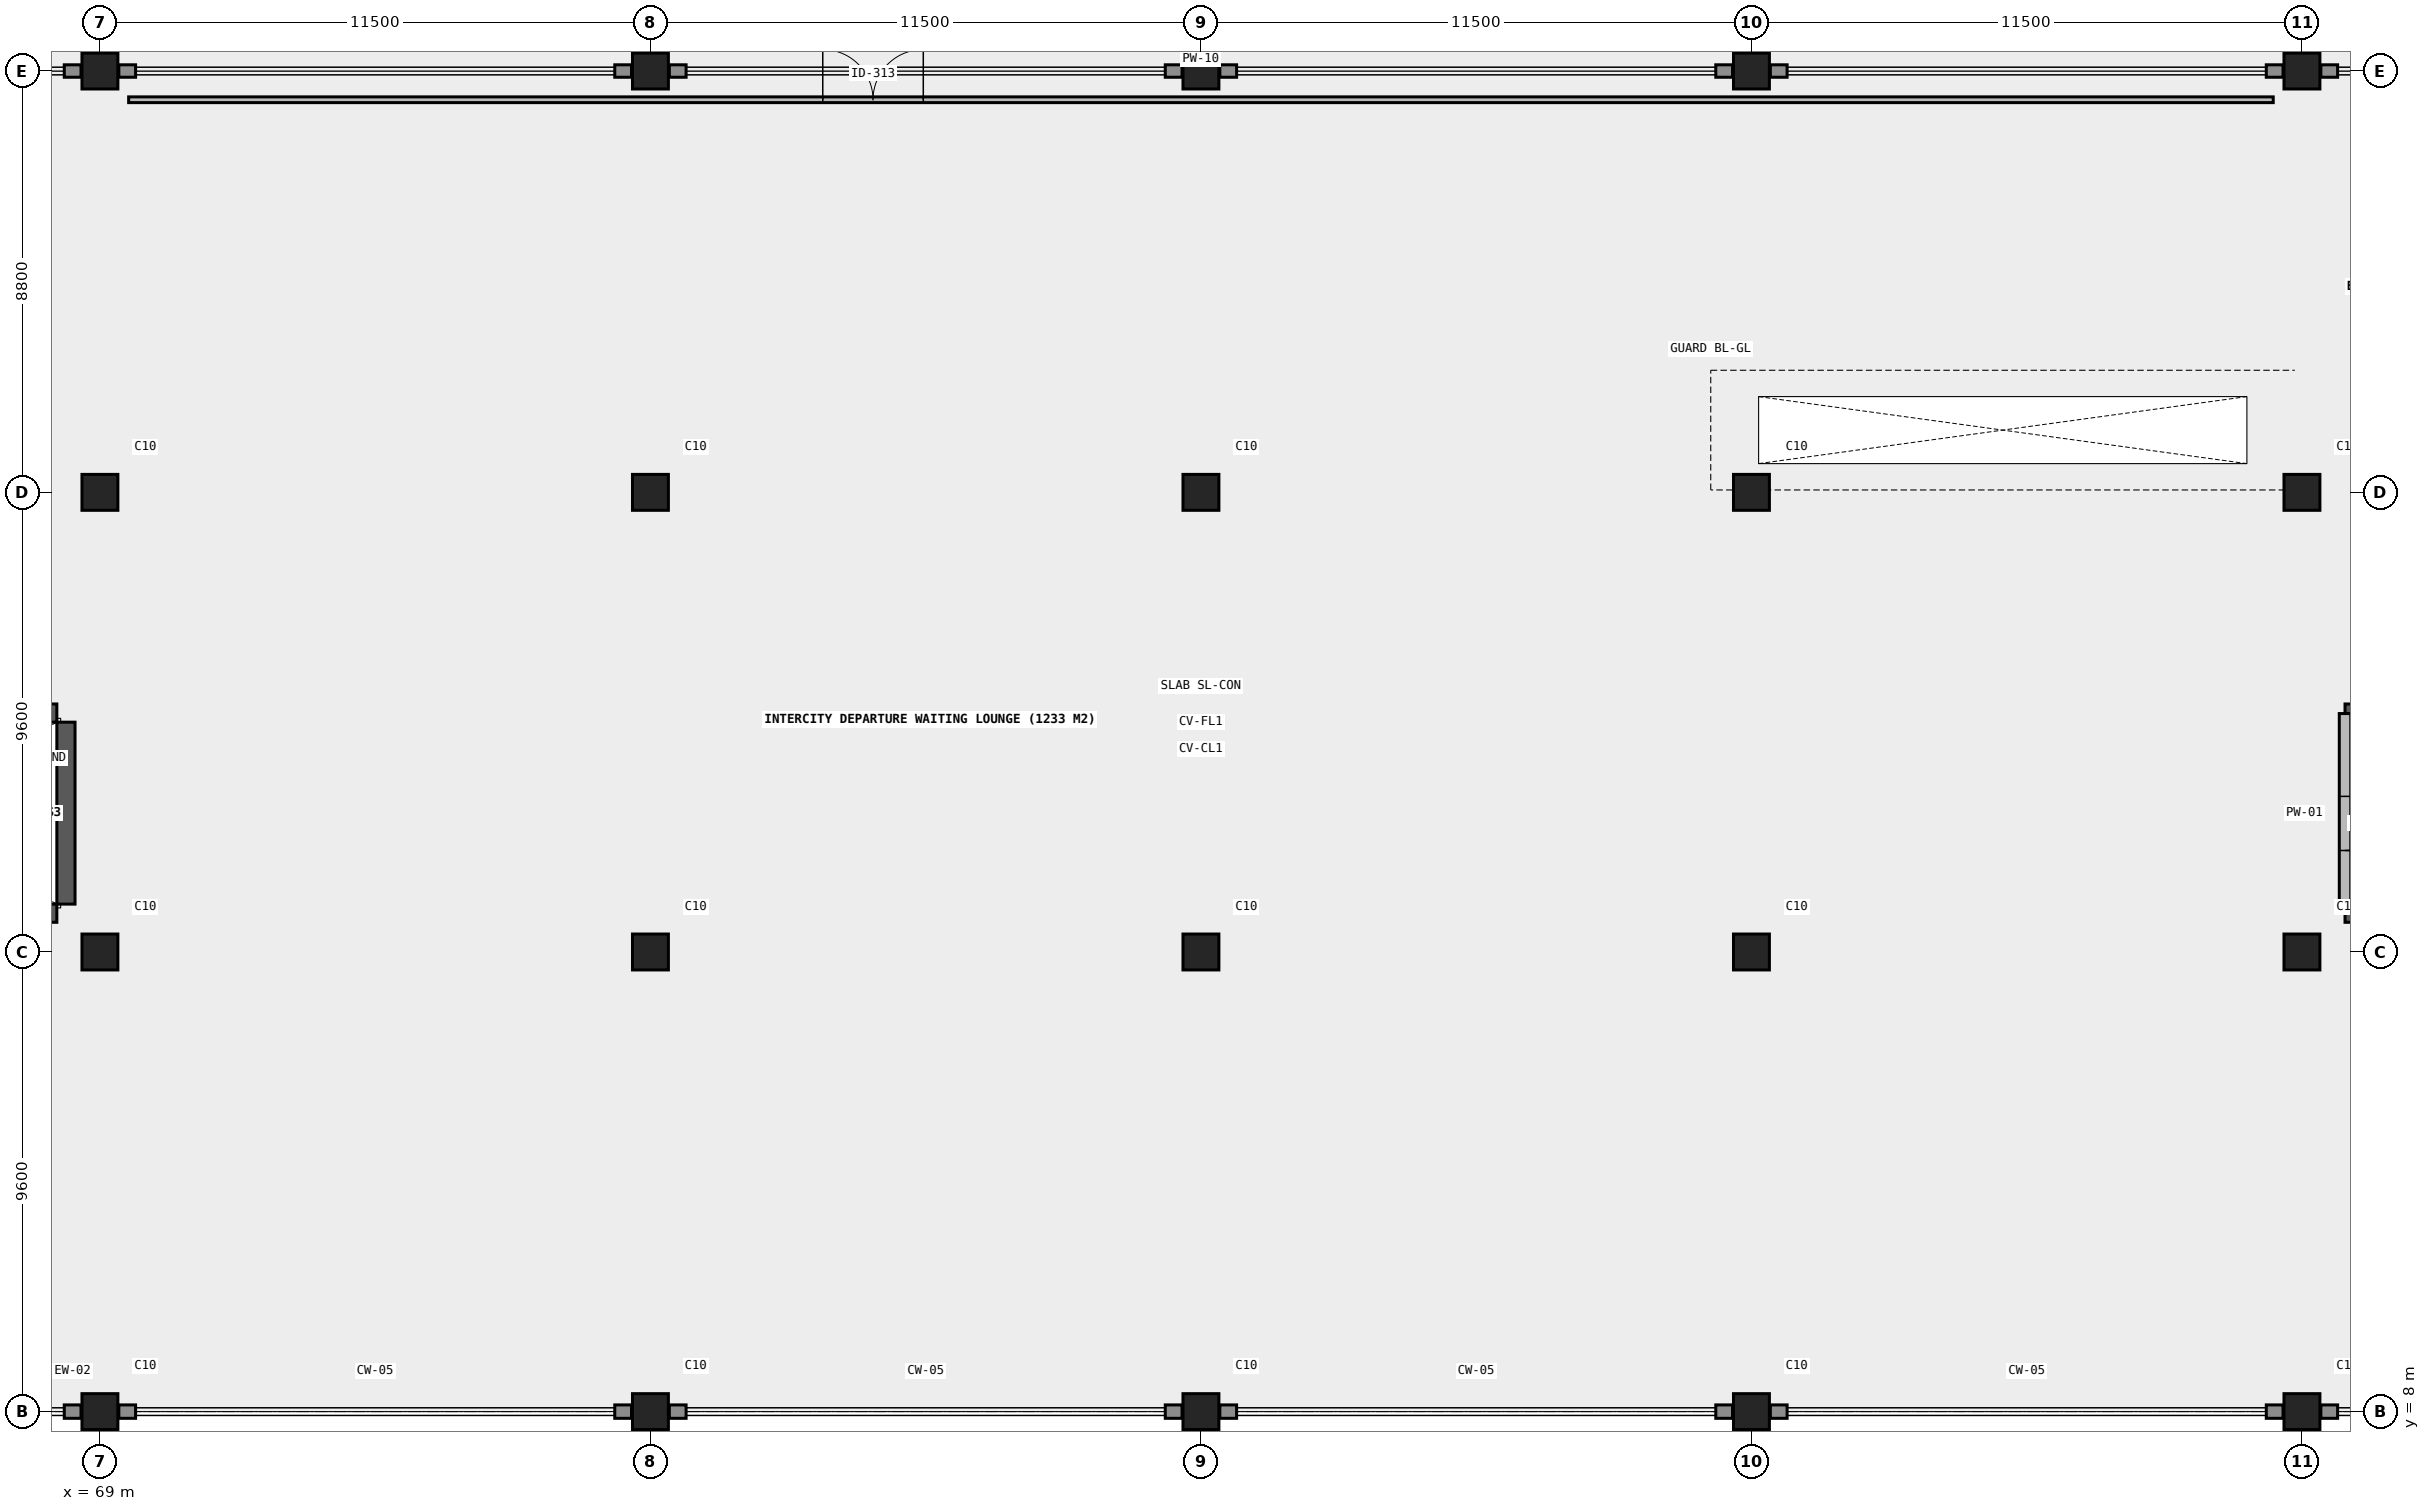
"""IFC4 building model, lengths in metres.
Left out: names, types, materials, properties, quantities, classifications, styles, units other than length and angle.
Written with IfcOpenShell. Run it as: python <this file> out.ifc"""

import sys

from ifc_helpers import new_model, si_unit, direction, frame, frame_2d, origin, origin_2d, place, context, subcontext, project, spatial, rectangle, circle, extrude, element, fill, save


model = new_model("IFC4")
c1 = context("Model", 3, precision=1e-05, world=origin(), true_north=direction((0.0, 1.0)))
c2 = subcontext(c1, "Body", "Model", "MODEL_VIEW")
j1 = project(units=[si_unit("LENGTHUNIT", "METRE"), si_unit("PLANEANGLEUNIT", "RADIAN")], contexts=[c1])
p1 = place(None, origin())
s1 = spatial("IfcSite", under=j1, at=p1, CompositionType="ELEMENT")
p2 = place(p1, origin())
s2 = spatial("IfcBuilding", under=s1, at=p2, CompositionType="ELEMENT")
p3 = place(p2, frame((0.0, 0.0, 8.4)))
s3 = spatial("IfcBuildingStorey", under=s2, at=p3, CompositionType="ELEMENT", Elevation=8.4)
for number, where, z_axis, x_axis in (
    (1, (69.0, 8.0, 0.0), (0.0, 0.0, 1.0), (1.0, 0.0, 0.0)),
    (2, (69.0, 17.6, 0.0), (0.0, 0.0, 1.0), (1.0, 0.0, 0.0)),
    (3, (69.0, 27.2, 0.0), (0.0, 0.0, 1.0), (1.0, 0.0, 0.0)),
):
    element("IfcColumn", number, at=place(p3, frame(where, z_axis=z_axis, x_axis=x_axis)), inside=s3, PredefinedType="COLUMN", context=c2, shape_type="SweptSolid", body=[
        extrude(circle(Radius=0.375, at=origin_2d()), origin(), (0.0, 0.0, 1.0), 5.4),
    ])
p4 = place(p3, frame((69.0, 36.0, 0.0), z_axis=(0.0, 0.0, 1.0), x_axis=(1.0, 0.0, 0.0)))
e4 = element("IfcColumn", 4, at=p4, inside=s3, PredefinedType="COLUMN", context=c2, shape_type="SweptSolid", body=[
    extrude(rectangle(XDim=0.75, YDim=0.75, at=origin_2d()), origin(), (0.0, 0.0, 1.0), 5.4),
])
for number, where, z_axis, x_axis in (
    (5, (80.5, 8.0, 0.0), (0.0, 0.0, 1.0), (1.0, 0.0, 0.0)),
    (6, (80.5, 17.6, 0.0), (0.0, 0.0, 1.0), (1.0, 0.0, 0.0)),
    (7, (80.5, 27.2, 0.0), (0.0, 0.0, 1.0), (1.0, 0.0, 0.0)),
):
    element("IfcColumn", number, at=place(p3, frame(where, z_axis=z_axis, x_axis=x_axis)), inside=s3, PredefinedType="COLUMN", context=c2, shape_type="SweptSolid", body=[
        extrude(circle(Radius=0.375, at=origin_2d()), origin(), (0.0, 0.0, 1.0), 5.4),
    ])
p5 = place(p3, frame((80.5, 36.0, 0.0), z_axis=(0.0, 0.0, 1.0), x_axis=(1.0, 0.0, 0.0)))
e8 = element("IfcColumn", 8, at=p5, inside=s3, PredefinedType="COLUMN", context=c2, shape_type="SweptSolid", body=[
    extrude(rectangle(XDim=0.75, YDim=0.75, at=origin_2d()), origin(), (0.0, 0.0, 1.0), 5.4),
])
for number, where, z_axis, x_axis in (
    (9, (92.0, 8.0, 0.0), (0.0, 0.0, 1.0), (1.0, 0.0, 0.0)),
    (10, (92.0, 17.6, 0.0), (0.0, 0.0, 1.0), (1.0, 0.0, 0.0)),
    (11, (92.0, 27.2, 0.0), (0.0, 0.0, 1.0), (1.0, 0.0, 0.0)),
):
    element("IfcColumn", number, at=place(p3, frame(where, z_axis=z_axis, x_axis=x_axis)), inside=s3, PredefinedType="COLUMN", context=c2, shape_type="SweptSolid", body=[
        extrude(circle(Radius=0.375, at=origin_2d()), origin(), (0.0, 0.0, 1.0), 5.4),
    ])
p6 = place(p3, frame((92.0, 36.0, 0.0), z_axis=(0.0, 0.0, 1.0), x_axis=(1.0, 0.0, 0.0)))
e12 = element("IfcColumn", 12, at=p6, inside=s3, PredefinedType="COLUMN", context=c2, shape_type="SweptSolid", body=[
    extrude(rectangle(XDim=0.75, YDim=0.75, at=origin_2d()), origin(), (0.0, 0.0, 1.0), 5.4),
])
for number, where, z_axis, x_axis in (
    (13, (103.5, 8.0, 0.0), (0.0, 0.0, 1.0), (1.0, 0.0, 0.0)),
    (14, (103.5, 17.6, 0.0), (0.0, 0.0, 1.0), (1.0, 0.0, 0.0)),
    (15, (103.5, 27.2, 0.0), (0.0, 0.0, 1.0), (1.0, 0.0, 0.0)),
):
    element("IfcColumn", number, at=place(p3, frame(where, z_axis=z_axis, x_axis=x_axis)), inside=s3, PredefinedType="COLUMN", context=c2, shape_type="SweptSolid", body=[
        extrude(circle(Radius=0.375, at=origin_2d()), origin(), (0.0, 0.0, 1.0), 5.4),
    ])
p7 = place(p3, frame((103.5, 36.0, 0.0), z_axis=(0.0, 0.0, 1.0), x_axis=(1.0, 0.0, 0.0)))
e16 = element("IfcColumn", 16, at=p7, inside=s3, PredefinedType="COLUMN", context=c2, shape_type="SweptSolid", body=[
    extrude(rectangle(XDim=0.75, YDim=0.75, at=origin_2d()), origin(), (0.0, 0.0, 1.0), 5.4),
])
for number, where, z_axis, x_axis in (
    (17, (115.0, 8.0, 0.0), (0.0, 0.0, 1.0), (1.0, 0.0, 0.0)),
    (18, (115.0, 17.6, 0.0), (0.0, 0.0, 1.0), (1.0, 0.0, 0.0)),
    (19, (115.0, 27.2, 0.0), (0.0, 0.0, 1.0), (1.0, 0.0, 0.0)),
):
    element("IfcColumn", number, at=place(p3, frame(where, z_axis=z_axis, x_axis=x_axis)), inside=s3, PredefinedType="COLUMN", context=c2, shape_type="SweptSolid", body=[
        extrude(circle(Radius=0.375, at=origin_2d()), origin(), (0.0, 0.0, 1.0), 5.4),
    ])
p8 = place(p3, frame((115.0, 36.0, 0.0), z_axis=(0.0, 0.0, 1.0), x_axis=(1.0, 0.0, 0.0)))
e20 = element("IfcColumn", 20, at=p8, inside=s3, PredefinedType="COLUMN", context=c2, shape_type="SweptSolid", body=[
    extrude(rectangle(XDim=0.75, YDim=0.75, at=origin_2d()), origin(), (0.0, 0.0, 1.0), 5.4),
])
p9 = place(p3, frame((58.7, 18.41, 0.0), z_axis=(0.0, 0.0, 1.0), x_axis=(1.0, 0.0, 0.0)))
e21 = element("IfcWall", 21, at=p9, inside=s3, PredefinedType="SHEAR", context=c2, shape_type="SweptSolid", body=[
    extrude(rectangle(XDim=9.4, YDim=0.38, at=frame_2d((4.7, 0.0))), origin(), (0.0, 0.0, 1.0), 5.4),
])
p10 = place(p3, frame((58.7, 22.59, 0.0), z_axis=(0.0, 0.0, 1.0), x_axis=(1.0, 0.0, 0.0)))
e22 = element("IfcWall", 22, at=p10, inside=s3, PredefinedType="SHEAR", context=c2, shape_type="SweptSolid", body=[
    extrude(rectangle(XDim=9.4, YDim=0.38, at=frame_2d((4.7, 0.0))), origin(), (0.0, 0.0, 1.0), 5.4),
])
p11 = place(p10, frame((0.55, 0.0, 0.0)))
e23 = element("IfcOpeningElement", 23, at=p11, cuts=e22, PredefinedType="OPENING", context=c2, shape_type="SweptSolid", body=[
    extrude(rectangle(XDim=1.13, YDim=2.15, at=frame_2d((0.565, 1.075))), frame((0.0, 0.2, 0.0), z_axis=(0.0, -1.0, 0.0), x_axis=(1.0, 0.0, 0.0)), (0.0, 0.0, 1.0), 0.4),
])
p12 = place(p3, frame((68.29, 18.6, 0.0), z_axis=(0.0, 0.0, 1.0), x_axis=(0.0, 1.0, 0.0)))
e24 = element("IfcWall", 24, at=p12, inside=s3, PredefinedType="SHEAR", context=c2, shape_type="SweptSolid", body=[
    extrude(rectangle(XDim=3.8, YDim=0.38, at=frame_2d((1.9, 0.0))), origin(), (0.0, 0.0, 1.0), 5.4),
])
p13 = place(p3, frame((115.9, 18.41, 0.0), z_axis=(0.0, 0.0, 1.0), x_axis=(1.0, 0.0, 0.0)))
e25 = element("IfcWall", 25, at=p13, inside=s3, PredefinedType="SHEAR", context=c2, shape_type="SweptSolid", body=[
    extrude(rectangle(XDim=9.4, YDim=0.38, at=frame_2d((4.7, 0.0))), origin(), (0.0, 0.0, 1.0), 5.4),
])
p14 = place(p3, frame((115.9, 22.59, 0.0), z_axis=(0.0, 0.0, 1.0), x_axis=(1.0, 0.0, 0.0)))
e26 = element("IfcWall", 26, at=p14, inside=s3, PredefinedType="SHEAR", context=c2, shape_type="SweptSolid", body=[
    extrude(rectangle(XDim=9.4, YDim=0.38, at=frame_2d((4.7, 0.0))), origin(), (0.0, 0.0, 1.0), 5.4),
])
p15 = place(p14, frame((0.55, 0.0, 0.0)))
e27 = element("IfcOpeningElement", 27, at=p15, cuts=e26, PredefinedType="OPENING", context=c2, shape_type="SweptSolid", body=[
    extrude(rectangle(XDim=1.13, YDim=2.15, at=frame_2d((0.565, 1.075))), frame((0.0, 0.2, 0.0), z_axis=(0.0, -1.0, 0.0), x_axis=(1.0, 0.0, 0.0)), (0.0, 0.0, 1.0), 0.4),
])
for number, where, z_axis, x_axis in (
    (28, (68.255, 8.0, 0.0), (0.0, 0.0, 1.0), (1.0, 0.0, 0.0)),
    (29, (69.395, 8.0, 0.0), (0.0, 0.0, 1.0), (1.0, 0.0, 0.0)),
    (30, (79.755, 8.0, 0.0), (0.0, 0.0, 1.0), (1.0, 0.0, 0.0)),
    (31, (80.895, 8.0, 0.0), (0.0, 0.0, 1.0), (1.0, 0.0, 0.0)),
    (32, (91.255, 8.0, 0.0), (0.0, 0.0, 1.0), (1.0, 0.0, 0.0)),
    (33, (92.395, 8.0, 0.0), (0.0, 0.0, 1.0), (1.0, 0.0, 0.0)),
    (34, (102.755, 8.0, 0.0), (0.0, 0.0, 1.0), (1.0, 0.0, 0.0)),
    (35, (103.895, 8.0, 0.0), (0.0, 0.0, 1.0), (1.0, 0.0, 0.0)),
    (36, (114.255, 8.0, 0.0), (0.0, 0.0, 1.0), (1.0, 0.0, 0.0)),
    (37, (115.395, 8.0, 0.0), (0.0, 0.0, 1.0), (1.0, 0.0, 0.0)),
):
    element("IfcWall", number, at=place(p3, frame(where, z_axis=z_axis, x_axis=x_axis)), inside=s3, PredefinedType="SOLIDWALL", context=c2, shape_type="SweptSolid", body=[
        extrude(rectangle(XDim=0.35, YDim=0.28, at=frame_2d((0.175, 0.0))), origin(), (0.0, 0.0, 1.0), 5.14),
    ])
for number, where, z_axis, x_axis in (
    (38, (68.255, 36.0, 0.0), (0.0, 0.0, 1.0), (1.0, 0.0, 0.0)),
    (39, (69.395, 36.0, 0.0), (0.0, 0.0, 1.0), (1.0, 0.0, 0.0)),
    (40, (79.755, 36.0, 0.0), (0.0, 0.0, 1.0), (1.0, 0.0, 0.0)),
    (41, (80.895, 36.0, 0.0), (0.0, 0.0, 1.0), (1.0, 0.0, 0.0)),
    (42, (91.255, 36.0, 0.0), (0.0, 0.0, 1.0), (1.0, 0.0, 0.0)),
    (43, (92.395, 36.0, 0.0), (0.0, 0.0, 1.0), (1.0, 0.0, 0.0)),
    (44, (102.755, 36.0, 0.0), (0.0, 0.0, 1.0), (1.0, 0.0, 0.0)),
    (45, (103.895, 36.0, 0.0), (0.0, 0.0, 1.0), (1.0, 0.0, 0.0)),
    (46, (114.255, 36.0, 0.0), (0.0, 0.0, 1.0), (1.0, 0.0, 0.0)),
    (47, (115.395, 36.0, 0.0), (0.0, 0.0, 1.0), (1.0, 0.0, 0.0)),
):
    element("IfcWall", number, at=place(p3, frame(where, z_axis=z_axis, x_axis=x_axis)), inside=s3, PredefinedType="SOLIDWALL", context=c2, shape_type="SweptSolid", body=[
        extrude(rectangle(XDim=0.35, YDim=0.26, at=frame_2d((0.175, 0.0))), origin(), (0.0, 0.0, 1.0), 5.1),
    ])
p16 = place(p3, frame((115.9, 18.42, 0.0), z_axis=(0.0, 0.0, 1.0), x_axis=(0.0, 1.0, 0.0)))
e48 = element("IfcWall", 48, at=p16, inside=s3, PredefinedType="SOLIDWALL", context=c2, shape_type="SweptSolid", body=[
    extrude(rectangle(XDim=4.16, YDim=0.24, at=frame_2d((2.08, 0.0))), origin(), (0.0, 0.0, 1.0), 5.12),
])
p17 = place(p16, frame((1.3, 0.0, 0.0)))
e49 = element("IfcOpeningElement", 49, at=p17, cuts=e48, PredefinedType="OPENING", context=c2, shape_type="SweptSolid", body=[
    extrude(rectangle(XDim=1.13, YDim=2.15, at=frame_2d((0.565, 1.075))), frame((0.0, 0.13, 0.0), z_axis=(0.0, -1.0, 0.0), x_axis=(1.0, 0.0, 0.0)), (0.0, 0.0, 1.0), 0.26),
])
p18 = place(p3, frame((69.6, 35.4, 0.0), z_axis=(0.0, 0.0, 1.0), x_axis=(1.0, 0.0, 0.0)))
e50 = element("IfcWall", 50, at=p18, inside=s3, PredefinedType="MOVABLE", context=c2, shape_type="SweptSolid", body=[
    extrude(rectangle(XDim=44.8, YDim=0.12, at=frame_2d((22.4, 0.0))), origin(), (0.0, 0.0, 1.0), 5.12),
])
p19 = place(p18, frame((14.5, 0.0, 0.0)))
e51 = element("IfcOpeningElement", 51, at=p19, cuts=e50, PredefinedType="OPENING", context=c2, shape_type="SweptSolid", body=[
    extrude(rectangle(XDim=2.1, YDim=2.35, at=frame_2d((1.05, 1.175))), frame((0.0, 0.07, 0.0), z_axis=(0.0, -1.0, 0.0), x_axis=(1.0, 0.0, 0.0)), (0.0, 0.0, 1.0), 0.14),
])
p20 = place(p17, frame((0.565, 0.0, 0.0), z_axis=(0.0, 0.0, 1.0), x_axis=(-1.0, 0.0, 0.0)))
e52 = element("IfcDoor", 52, at=p20, inside=s3, OperationType="SINGLE_SWING_LEFT", PredefinedType="DOOR", context=c2, shape_type="SweptSolid", body=[
    extrude(rectangle(XDim=1.13, YDim=2.15, at=frame_2d((0.0, 1.075))), frame((0.0, 0.025, 0.0), z_axis=(0.0, -1.0, 0.0), x_axis=(1.0, 0.0, 0.0)), (0.0, 0.0, 1.0), 0.05),
])
fill(e49, e52)
p21 = place(p19, origin())
e53 = element("IfcDoor", 53, at=p21, inside=s3, OperationType="DOUBLE_DOOR_SINGLE_SWING", PredefinedType="DOOR", context=c2, shape_type="SweptSolid", body=[
    extrude(rectangle(XDim=2.1, YDim=2.35, at=frame_2d((1.05, 1.175))), frame((0.0, 0.025, 0.0), z_axis=(0.0, -1.0, 0.0), x_axis=(1.0, 0.0, 0.0)), (0.0, 0.0, 1.0), 0.05),
])
fill(e51, e53)
save(model, sys.argv[1])
